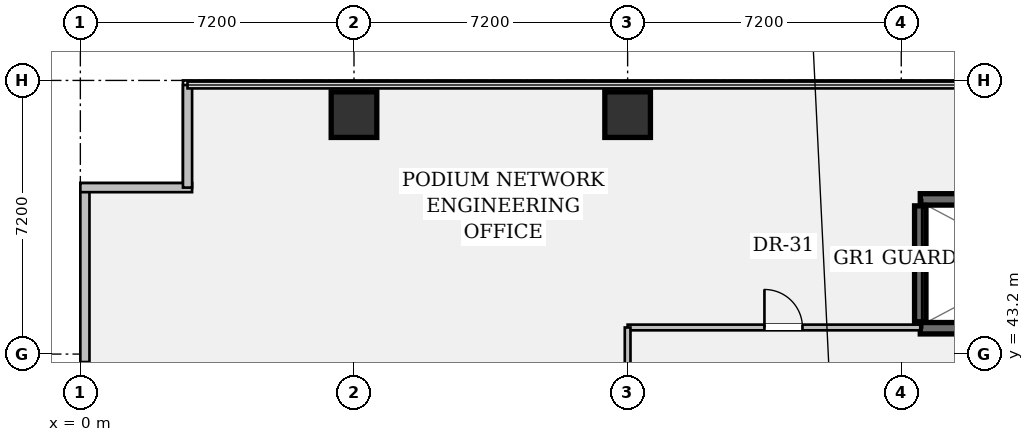
"""IFC4 building model, lengths in metres.
Left out: names, types, materials, properties, quantities, classifications, styles, units other than length and angle.
Written with IfcOpenShell. Run it as: python <this file> out.ifc"""

import sys

from ifc_helpers import new_model, si_unit, direction, frame, frame_2d, origin, origin_2d, place, context, subcontext, project, spatial, rectangle, hollow_rectangle, extrude, element, fill, save


model = new_model("IFC4")
c1 = context("Model", 3, precision=1e-05, world=origin(), true_north=direction((0.0, 1.0)))
c2 = subcontext(c1, "Body", "Model", "MODEL_VIEW")
j1 = project(units=[si_unit("LENGTHUNIT", "METRE"), si_unit("PLANEANGLEUNIT", "RADIAN")], contexts=[c1])
p1 = place(None, origin())
s1 = spatial("IfcSite", under=j1, at=p1, CompositionType="ELEMENT")
p2 = place(p1, origin())
s2 = spatial("IfcBuilding", under=s1, at=p2, CompositionType="ELEMENT")
p3 = place(p2, frame((0.0, 0.0, 5.25)))
s3 = spatial("IfcBuildingStorey", under=s2, at=p3, CompositionType="ELEMENT", Elevation=5.25)
p4 = place(p3, frame((22.1, 43.88, 0.0), z_axis=(0.0, 0.0, 1.0), x_axis=(1.0, 0.0, 0.0)))
e1 = element("IfcWall", 1, at=p4, inside=s3, PredefinedType="SHEAR", context=c2, shape_type="SweptSolid", body=[
    extrude(rectangle(XDim=8.15, YDim=0.3, at=frame_2d((4.075, 0.0))), origin(), (0.0, 0.0, 1.0), 3.9),
])
p5 = place(p4, frame((6.45, 0.0, 0.0)))
e2 = element("IfcOpeningElement", 2, at=p5, cuts=e1, PredefinedType="OPENING", context=c2, shape_type="SweptSolid", body=[
    extrude(rectangle(XDim=1.1, YDim=2.15, at=frame_2d((0.55, 1.075))), frame((0.0, 0.162, 0.0), z_axis=(0.0, -1.0, 0.0), x_axis=(1.0, 0.0, 0.0)), (0.0, 0.0, 1.0), 0.324),
])
p6 = place(p3, frame((22.1, 47.27, 0.0), z_axis=(0.0, 0.0, 1.0), x_axis=(1.0, 0.0, 0.0)))
e3 = element("IfcWall", 3, at=p6, inside=s3, PredefinedType="SHEAR", context=c2, shape_type="SweptSolid", body=[
    extrude(rectangle(XDim=8.15, YDim=0.3, at=frame_2d((4.075, 0.0))), origin(), (0.0, 0.0, 1.0), 3.9),
])
p7 = place(p3, frame((22.1, 44.05, 0.0), z_axis=(0.0, 0.0, 1.0), x_axis=(0.0, 1.0, 0.0)))
e4 = element("IfcWall", 4, at=p7, inside=s3, PredefinedType="SHEAR", context=c2, shape_type="SweptSolid", body=[
    extrude(rectangle(XDim=3.05, YDim=0.3, at=frame_2d((1.525, 0.0))), origin(), (0.0, 0.0, 1.0), 3.9),
])
for number, where, z_axis, x_axis in (
    (5, (7.2, 49.5, 0.0), (0.0, 0.0, 1.0), (1.0, 0.0, 0.0)),
    (6, (14.4, 49.5, 0.0), (0.0, 0.0, 1.0), (1.0, 0.0, 0.0)),
):
    element("IfcColumn", number, at=place(p3, frame(where, z_axis=z_axis, x_axis=x_axis)), inside=s3, PredefinedType="COLUMN", context=c2, shape_type="SweptSolid", body=[
        extrude(hollow_rectangle(XDim=1.2, YDim=1.2, WallThickness=0.075, at=origin_2d()), origin(), (0.0, 0.0, 1.0), 3.9),
    ])
p8 = place(p3, frame((0.12, 36.0, 0.0), z_axis=(0.0, 0.0, 1.0), x_axis=(0.0, 1.0, 0.0)))
e7 = element("IfcWall", 7, at=p8, inside=s3, PredefinedType="STANDARD", context=c2, shape_type="SweptSolid", body=[
    extrude(rectangle(XDim=11.58, YDim=0.24, at=frame_2d((5.79, 0.0))), origin(), (0.0, 0.0, 1.0), 3.9),
])
p9 = place(p8, frame((4.59, 0.0, 0.95)))
e8 = element("IfcOpeningElement", 8, at=p9, cuts=e7, PredefinedType="OPENING", context=c2, shape_type="SweptSolid", body=[
    extrude(rectangle(XDim=2.4, YDim=1.8, at=frame_2d((1.2, 0.9))), frame((0.0, 0.132, 0.0), z_axis=(0.0, -1.0, 0.0), x_axis=(1.0, 0.0, 0.0)), (0.0, 0.0, 1.0), 0.264),
])
p10 = place(p3, frame((0.0, 47.58, 0.0), z_axis=(0.0, 0.0, 1.0), x_axis=(1.0, 0.0, 0.0)))
e9 = element("IfcWall", 9, at=p10, inside=s3, PredefinedType="STANDARD", context=c2, shape_type="SweptSolid", body=[
    extrude(rectangle(XDim=2.94, YDim=0.24, at=frame_2d((1.47, 0.0))), origin(), (0.0, 0.0, 1.0), 3.9),
])
p11 = place(p3, frame((2.82, 47.58, 0.0), z_axis=(0.0, 0.0, 1.0), x_axis=(0.0, 1.0, 0.0)))
e10 = element("IfcWall", 10, at=p11, inside=s3, PredefinedType="STANDARD", context=c2, shape_type="SweptSolid", body=[
    extrude(rectangle(XDim=2.7, YDim=0.24, at=frame_2d((1.35, 0.0))), origin(), (0.0, 0.0, 1.0), 3.9),
])
p12 = place(p3, frame((14.4, 43.9, 0.0), z_axis=(0.0, 0.0, 1.0), x_axis=(1.0, 0.0, 0.0)))
e11 = element("IfcWall", 11, at=p12, inside=s3, PredefinedType="PARTITIONING", context=c2, shape_type="SweptSolid", body=[
    extrude(rectangle(XDim=7.7, YDim=0.15, at=frame_2d((3.85, 0.0))), origin(), (0.0, 0.0, 1.0), 2.938),
])
p13 = place(p12, frame((3.6, 0.0, 0.0)))
e12 = element("IfcOpeningElement", 12, at=p13, cuts=e11, PredefinedType="OPENING", context=c2, shape_type="SweptSolid", body=[
    extrude(rectangle(XDim=1.0, YDim=2.15, at=frame_2d((0.5, 1.075))), frame((0.0, 0.087, 0.0), z_axis=(0.0, -1.0, 0.0), x_axis=(1.0, 0.0, 0.0)), (0.0, 0.0, 1.0), 0.174),
])
p14 = place(p3, frame((14.4, 36.0, 0.0), z_axis=(0.0, 0.0, 1.0), x_axis=(0.0, 1.0, 0.0)))
e13 = element("IfcWall", 13, at=p14, inside=s3, PredefinedType="PARTITIONING", context=c2, shape_type="SweptSolid", body=[
    extrude(rectangle(XDim=7.9, YDim=0.15, at=frame_2d((3.95, 0.0))), origin(), (0.0, 0.0, 1.0), 2.938),
])
p15 = place(p14, frame((2.6, 0.0, 0.0)))
e14 = element("IfcOpeningElement", 14, at=p15, cuts=e13, PredefinedType="OPENING", context=c2, shape_type="SweptSolid", body=[
    extrude(rectangle(XDim=1.0, YDim=2.15, at=frame_2d((0.5, 1.075))), frame((0.0, 0.087, 0.0), z_axis=(0.0, -1.0, 0.0), x_axis=(1.0, 0.0, 0.0)), (0.0, 0.0, 1.0), 0.174),
])
p16 = place(p13, origin())
e15 = element("IfcDoor", 15, at=p16, inside=s3, OperationType="SINGLE_SWING_LEFT", PredefinedType="DOOR", context=c2, shape_type="SweptSolid", body=[
    extrude(rectangle(XDim=1.0, YDim=2.15, at=frame_2d((0.5, 1.075))), frame((0.0, 0.025, 0.0), z_axis=(0.0, -1.0, 0.0), x_axis=(1.0, 0.0, 0.0)), (0.0, 0.0, 1.0), 0.05),
])
fill(e12, e15)
save(model, sys.argv[1])
